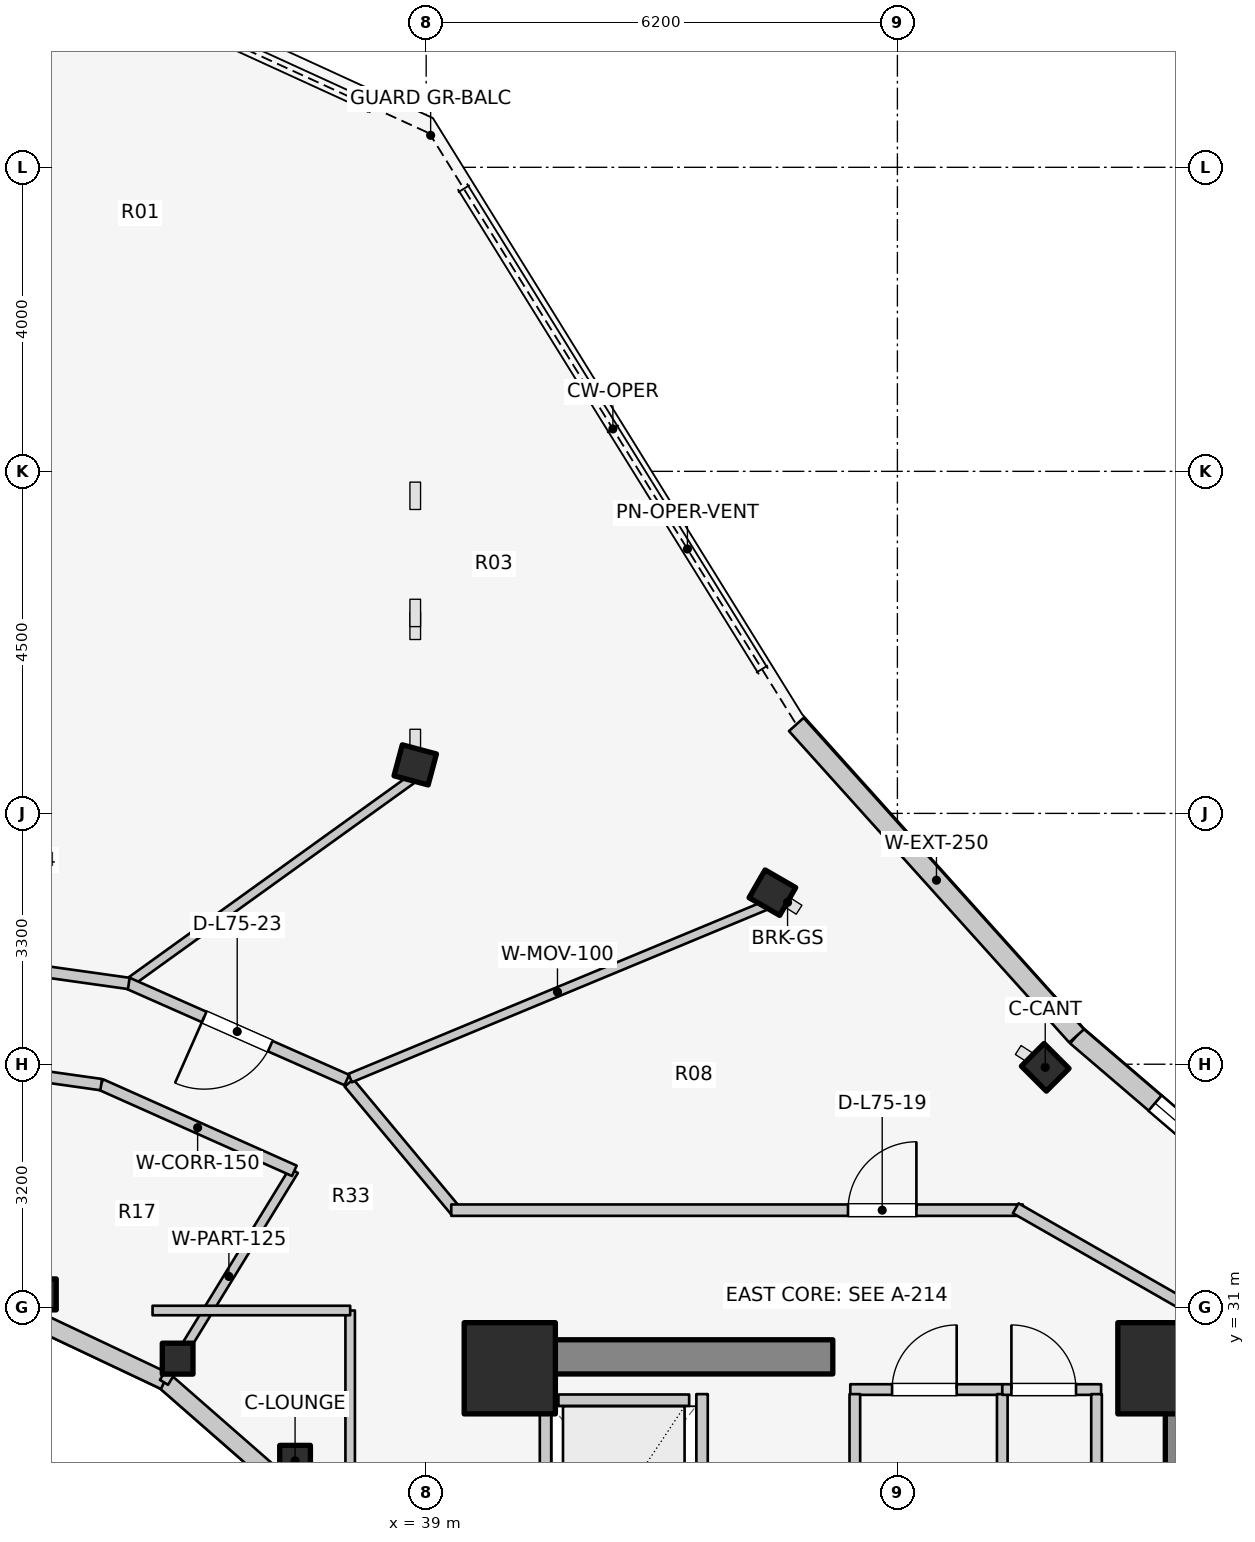
"""IFC4 building model, lengths in metres.
Left out: names, types, materials, properties, quantities, classifications, styles, units other than length and angle.
Written with IfcOpenShell. Run it as: python <this file> out.ifc"""

import sys

from ifc_helpers import new_model, si_unit, direction, frame, frame_2d, origin, origin_2d, place, context, subcontext, project, spatial, rectangle, i_section, extrude, element, fill, save


model = new_model("IFC4")
c1 = context("Model", 3, precision=1e-05, world=origin(), true_north=direction((0.0, 1.0)))
c2 = subcontext(c1, "Body", "Model", "MODEL_VIEW")
j1 = project(units=[si_unit("LENGTHUNIT", "METRE"), si_unit("PLANEANGLEUNIT", "RADIAN")], contexts=[c1])
p1 = place(None, origin())
s1 = spatial("IfcSite", under=j1, at=p1, CompositionType="ELEMENT")
p2 = place(p1, origin())
s2 = spatial("IfcBuilding", under=s1, at=p2, CompositionType="ELEMENT")
p3 = place(p2, frame((0.0, 0.0, 246.0)))
s3 = spatial("IfcBuildingStorey", under=s2, at=p3, CompositionType="ELEMENT", Elevation=246.0)
p4 = place(p3, frame((48.95, 17.05, 0.0), z_axis=(0.0, 0.0, 1.0), x_axis=(0.0, 1.0, 0.0)))
e1 = element("IfcWall", 1, at=p4, inside=s3, PredefinedType="SHEAR", context=c2, shape_type="SweptSolid", body=[
    extrude(rectangle(XDim=12.8, YDim=0.45, at=frame_2d((6.4, 0.0))), origin(), (0.0, 0.0, 1.0), 3.6),
])
p5 = place(p3, frame((39.85, 30.35, 0.0), z_axis=(0.0, 0.0, 1.0), x_axis=(1.0, 0.0, 0.0)))
e2 = element("IfcWall", 2, at=p5, inside=s3, PredefinedType="SHEAR", context=c2, shape_type="SweptSolid", body=[
    extrude(rectangle(XDim=4.5, YDim=0.45, at=frame_2d((2.25, 0.0))), origin(), (0.0, 0.0, 1.0), 3.6),
])
for number, where, z_axis, x_axis in (
    (3, (48.7, 30.2, 0.0), (0.0, 0.0, 1.0), (1.0, 0.0, 0.0)),
    (4, (40.1, 30.2, 0.0), (0.0, 0.0, 1.0), (1.0, 0.0, 0.0)),
):
    element("IfcColumn", number, at=place(p3, frame(where, z_axis=z_axis, x_axis=x_axis)), inside=s3, PredefinedType="COLUMN", context=c2, shape_type="SweptSolid", body=[
        extrude(rectangle(XDim=1.2, YDim=1.2, at=origin_2d()), origin(), (0.0, 0.0, 1.0), 3.6),
    ])
p6 = place(p3, frame((37.275, 28.982, 0.0), z_axis=(0.0, 0.0, 1.0), x_axis=(1.0, 0.0, 0.0)))
e5 = element("IfcColumn", 5, at=p6, inside=s3, PredefinedType="COLUMN", context=c2, shape_type="SweptSolid", body=[
    extrude(i_section(OverallWidth=0.404, OverallDepth=0.407, WebThickness=0.027, FlangeThickness=0.044, FilletRadius=0.025, at=origin_2d()), origin(), (0.0, 0.0, 1.0), 3.6),
])
p7 = place(p3, frame((47.145, 34.159, 0.0), z_axis=(0.0, 0.0, 1.0), x_axis=(0.707106781187, 0.707106781187, 0.0)))
e6 = element("IfcColumn", 6, at=p7, inside=s3, PredefinedType="COLUMN", context=c2, shape_type="SweptSolid", body=[
    extrude(i_section(OverallWidth=0.422, OverallDepth=0.465, WebThickness=0.045, FlangeThickness=0.073, FilletRadius=0.025, at=origin_2d()), origin(), (0.0, 0.0, 1.0), 3.6),
])
p8 = place(p3, frame((35.73, 30.327, 0.0), z_axis=(0.0, 0.0, 1.0), x_axis=(1.0, 0.0, 0.0)))
e7 = element("IfcColumn", 7, at=p8, inside=s3, PredefinedType="COLUMN", context=c2, shape_type="SweptSolid", body=[
    extrude(i_section(OverallWidth=0.404, OverallDepth=0.407, WebThickness=0.027, FlangeThickness=0.044, FilletRadius=0.025, at=origin_2d()), origin(), (0.0, 0.0, 1.0), 3.6),
])
p9 = place(p3, frame((43.555, 36.457, 0.0), z_axis=(0.0, 0.0, 1.0), x_axis=(0.5, 0.866025403784, 0.0)))
e8 = element("IfcColumn", 8, at=p9, inside=s3, PredefinedType="COLUMN", context=c2, shape_type="SweptSolid", body=[
    extrude(i_section(OverallWidth=0.422, OverallDepth=0.465, WebThickness=0.045, FlangeThickness=0.073, FilletRadius=0.025, at=origin_2d()), origin(), (0.0, 0.0, 1.0), 3.6),
])
p10 = place(p3, frame((33.931, 31.172, 0.0), z_axis=(0.0, 0.0, 1.0), x_axis=(1.0, 0.0, 0.0)))
e9 = element("IfcColumn", 9, at=p10, inside=s3, PredefinedType="COLUMN", context=c2, shape_type="SweptSolid", body=[
    extrude(i_section(OverallWidth=0.404, OverallDepth=0.407, WebThickness=0.027, FlangeThickness=0.044, FilletRadius=0.025, at=origin_2d()), origin(), (0.0, 0.0, 1.0), 3.6),
])
p11 = place(p3, frame((38.856, 38.138, 0.0), z_axis=(0.0, 0.0, 1.0), x_axis=(0.258819045103, 0.965925826289, 0.0)))
e10 = element("IfcColumn", 10, at=p11, inside=s3, PredefinedType="COLUMN", context=c2, shape_type="SweptSolid", body=[
    extrude(i_section(OverallWidth=0.422, OverallDepth=0.465, WebThickness=0.045, FlangeThickness=0.073, FilletRadius=0.025, at=origin_2d()), origin(), (0.0, 0.0, 1.0), 3.6),
])
p12 = place(p3, frame((37.035, 28.742, 0.0), z_axis=(0.0, 0.0, 1.0), x_axis=(-0.752576694707, 0.658504607869, 0.0)))
e11 = element("IfcWall", 11, at=p12, inside=s3, PredefinedType="STANDARD", context=c2, shape_type="SweptSolid", body=[
    extrude(rectangle(XDim=1.959, YDim=0.23, at=frame_2d((0.98, 0.0))), origin(), (0.0, 0.0, 1.0), 2.6),
])
p13 = place(p3, frame((35.56, 30.032, 0.0), z_axis=(0.0, 0.0, 1.0), x_axis=(-0.904179699603, 0.427152280606, 0.0)))
e12 = element("IfcWall", 12, at=p13, inside=s3, PredefinedType="STANDARD", context=c2, shape_type="SweptSolid", body=[
    extrude(rectangle(XDim=1.899, YDim=0.23, at=frame_2d((0.95, 0.0))), origin(), (0.0, 0.0, 1.0), 2.6),
])
p14 = place(p3, frame((50.761, 31.829, 0.0), z_axis=(0.0, 0.0, 1.0), x_axis=(-0.759587504333, 0.650405122413, 0.0)))
e13 = element("IfcWall", 13, at=p14, inside=s3, PredefinedType="STANDARD", context=c2, shape_type="SweptSolid", body=[
    extrude(rectangle(XDim=4.217, YDim=0.26, at=frame_2d((2.109, 0.0))), origin(), (0.0, 0.0, 1.0), 3.29),
])
p15 = place(p14, frame((1.359, 0.0, 0.75)))
e14 = element("IfcOpeningElement", 14, at=p15, cuts=e13, PredefinedType="OPENING", context=c2, shape_type="SweptSolid", body=[
    extrude(rectangle(XDim=1.5, YDim=1.6, at=frame_2d((0.75, 0.8))), frame((0.0, 0.14, 0.0), z_axis=(0.0, -1.0, 0.0), x_axis=(1.0, 0.0, 0.0)), (0.0, 0.0, 1.0), 0.28),
])
p16 = place(p3, frame((47.558, 34.572, 0.0), z_axis=(0.0, 0.0, 1.0), x_axis=(-0.668903560134, 0.743349196031, 0.0)))
e15 = element("IfcWall", 15, at=p16, inside=s3, PredefinedType="STANDARD", context=c2, shape_type="SweptSolid", body=[
    extrude(rectangle(XDim=5.513, YDim=0.26, at=frame_2d((2.756, 0.0))), origin(), (0.0, 0.0, 1.0), 3.29),
])
p17 = place(p3, frame((40.74, 29.78, 0.0), z_axis=(0.0, 0.0, 1.0), x_axis=(1.0, 0.0, 0.0)))
e16 = element("IfcWall", 16, at=p17, inside=s3, PredefinedType="SOLIDWALL", context=c2, shape_type="SweptSolid", body=[
    extrude(rectangle(XDim=1.72, YDim=0.15, at=frame_2d((0.86, 0.0))), origin(), (0.0, 0.0, 1.0), 3.295),
])
for number, where, z_axis, x_axis in (
    (17, (40.57, 27.14, 0.0), (0.0, 0.0, 1.0), (0.0, 1.0, 0.0)),
    (18, (42.63, 27.14, 0.0), (0.0, 0.0, 1.0), (0.0, 1.0, 0.0)),
):
    element("IfcWall", number, at=place(p3, frame(where, z_axis=z_axis, x_axis=x_axis)), inside=s3, PredefinedType="SOLIDWALL", context=c2, shape_type="SweptSolid", body=[
        extrude(rectangle(XDim=2.72, YDim=0.15, at=frame_2d((1.36, 0.0))), origin(), (0.0, 0.0, 1.0), 3.295),
    ])
p18 = place(p3, frame((44.58, 29.92, 0.0), z_axis=(0.0, 0.0, 1.0), x_axis=(1.0, 0.0, 0.0)))
e19 = element("IfcWall", 19, at=p18, inside=s3, PredefinedType="PLUMBINGWALL", context=c2, shape_type="SweptSolid", body=[
    extrude(rectangle(XDim=2.0, YDim=0.14, at=frame_2d((1.0, 0.0))), origin(), (0.0, 0.0, 1.0), 3.295),
])
p19 = place(p18, frame((0.55, 0.0, 0.0)))
e20 = element("IfcOpeningElement", 20, at=p19, cuts=e19, PredefinedType="OPENING", context=c2, shape_type="SweptSolid", body=[
    extrude(rectangle(XDim=0.85, YDim=2.05, at=frame_2d((0.425, 1.025))), frame((0.0, 0.08, 0.0), z_axis=(0.0, -1.0, 0.0), x_axis=(1.0, 0.0, 0.0)), (0.0, 0.0, 1.0), 0.16),
])
for number, where, z_axis, x_axis in (
    (21, (44.64, 25.98, 0.0), (0.0, 0.0, 1.0), (0.0, 1.0, 0.0)),
    (22, (46.58, 25.98, 0.0), (0.0, 0.0, 1.0), (0.0, 1.0, 0.0)),
):
    element("IfcWall", number, at=place(p3, frame(where, z_axis=z_axis, x_axis=x_axis)), inside=s3, PredefinedType="PLUMBINGWALL", context=c2, shape_type="SweptSolid", body=[
        extrude(rectangle(XDim=3.88, YDim=0.14, at=frame_2d((1.94, 0.0))), origin(), (0.0, 0.0, 1.0), 3.295),
    ])
p20 = place(p3, frame((46.58, 29.92, 0.0), z_axis=(0.0, 0.0, 1.0), x_axis=(1.0, 0.0, 0.0)))
e23 = element("IfcWall", 23, at=p20, inside=s3, PredefinedType="PLUMBINGWALL", context=c2, shape_type="SweptSolid", body=[
    extrude(rectangle(XDim=1.3, YDim=0.14, at=frame_2d((0.65, 0.0))), origin(), (0.0, 0.0, 1.0), 3.295),
])
p21 = place(p20, frame((0.12, 0.0, 0.0)))
e24 = element("IfcOpeningElement", 24, at=p21, cuts=e23, PredefinedType="OPENING", context=c2, shape_type="SweptSolid", body=[
    extrude(rectangle(XDim=0.85, YDim=2.05, at=frame_2d((0.425, 1.025))), frame((0.0, 0.08, 0.0), z_axis=(0.0, -1.0, 0.0), x_axis=(1.0, 0.0, 0.0)), (0.0, 0.0, 1.0), 0.16),
])
p22 = place(p3, frame((47.82, 25.98, 0.0), z_axis=(0.0, 0.0, 1.0), x_axis=(0.0, 1.0, 0.0)))
e25 = element("IfcWall", 25, at=p22, inside=s3, PredefinedType="PLUMBINGWALL", context=c2, shape_type="SweptSolid", body=[
    extrude(rectangle(XDim=3.88, YDim=0.14, at=frame_2d((1.94, 0.0))), origin(), (0.0, 0.0, 1.0), 3.295),
])
p23 = place(p3, frame((35.55, 30.015, 0.0), z_axis=(0.0, 0.0, 1.0), x_axis=(0.522763432117, 0.852477796802, 0.0)))
e26 = element("IfcWall", 26, at=p23, inside=s3, PredefinedType="PARTITIONING", context=c2, shape_type="SweptSolid", body=[
    extrude(rectangle(XDim=3.269, YDim=0.125, at=frame_2d((1.635, 0.0))), origin(), (0.0, 0.0, 1.0), 2.672),
])
p24 = place(p3, frame((37.265, 32.798, 0.0), z_axis=(0.0, 0.0, 1.0), x_axis=(-0.913254317828, 0.407389924971, 0.0)))
e27 = element("IfcWall", 27, at=p24, inside=s3, PredefinedType="PARTITIONING", context=c2, shape_type="SweptSolid", body=[
    extrude(rectangle(XDim=2.787, YDim=0.15, at=frame_2d((1.393, 0.0))), origin(), (0.0, 0.0, 1.0), 2.823),
])
p25 = place(p3, frame((34.724, 33.932, 0.0), z_axis=(0.0, 0.0, 1.0), x_axis=(-0.990150268487, 0.140008734782, 0.0)))
e28 = element("IfcWall", 28, at=p25, inside=s3, PredefinedType="PARTITIONING", context=c2, shape_type="SweptSolid", body=[
    extrude(rectangle(XDim=2.759, YDim=0.15, at=frame_2d((1.379, 0.0))), origin(), (0.0, 0.0, 1.0), 2.823),
])
p26 = place(p25, frame((0.904, 0.0, 0.0)))
e29 = element("IfcOpeningElement", 29, at=p26, cuts=e28, PredefinedType="OPENING", context=c2, shape_type="SweptSolid", body=[
    extrude(rectangle(XDim=0.95, YDim=2.1, at=frame_2d((0.475, 1.05))), frame((0.0, 0.085, 0.0), z_axis=(0.0, -1.0, 0.0), x_axis=(1.0, 0.0, 0.0)), (0.0, 0.0, 1.0), 0.17),
])
p27 = place(p3, frame((38.0, 25.8, 0.0), z_axis=(0.0, 0.0, 1.0), x_axis=(0.0, 1.0, 0.0)))
e30 = element("IfcWall", 30, at=p27, inside=s3, PredefinedType="PARTITIONING", context=c2, shape_type="SweptSolid", body=[
    extrude(rectangle(XDim=5.16, YDim=0.125, at=frame_2d((2.58, 0.0))), origin(), (0.0, 0.0, 1.0), 2.672),
])
p28 = place(p3, frame((35.4, 30.96, 0.0), z_axis=(0.0, 0.0, 1.0), x_axis=(1.0, 0.0, 0.0)))
e31 = element("IfcWall", 31, at=p28, inside=s3, PredefinedType="PARTITIONING", context=c2, shape_type="SweptSolid", body=[
    extrude(rectangle(XDim=2.6, YDim=0.125, at=frame_2d((1.3, 0.0))), origin(), (0.0, 0.0, 1.0), 2.816),
])
p29 = place(p3, frame((37.984, 33.955, 0.0), z_axis=(0.0, 0.0, 1.0), x_axis=(0.64030392053, -0.76812166312, 0.0)))
e32 = element("IfcWall", 32, at=p29, inside=s3, PredefinedType="PARTITIONING", context=c2, shape_type="SweptSolid", body=[
    extrude(rectangle(XDim=2.21, YDim=0.15, at=frame_2d((1.105, 0.0))), origin(), (0.0, 0.0, 1.0), 2.816),
])
p30 = place(p3, frame((39.33, 32.28, 0.0), z_axis=(0.0, 0.0, 1.0), x_axis=(1.0, 0.0, 0.0)))
e33 = element("IfcWall", 33, at=p30, inside=s3, PredefinedType="PARTITIONING", context=c2, shape_type="SweptSolid", body=[
    extrude(rectangle(XDim=7.52, YDim=0.15, at=frame_2d((3.76, 0.0))), origin(), (0.0, 0.0, 1.0), 2.816),
])
p31 = place(p30, frame((5.22, 0.0, 0.0)))
e34 = element("IfcOpeningElement", 34, at=p31, cuts=e33, PredefinedType="OPENING", context=c2, shape_type="SweptSolid", body=[
    extrude(rectangle(XDim=0.9, YDim=2.1, at=frame_2d((0.45, 1.05))), frame((0.0, 0.085, 0.0), z_axis=(0.0, -1.0, 0.0), x_axis=(1.0, 0.0, 0.0)), (0.0, 0.0, 1.0), 0.17),
])
p32 = place(p3, frame((46.757, 32.305, 0.0), z_axis=(0.0, 0.0, 1.0), x_axis=(0.867991349648, -0.496579315857, 0.0)))
e35 = element("IfcWall", 35, at=p32, inside=s3, PredefinedType="PARTITIONING", context=c2, shape_type="SweptSolid", body=[
    extrude(rectangle(XDim=2.567, YDim=0.15, at=frame_2d((1.283, 0.0))), origin(), (0.0, 0.0, 1.0), 2.66),
])
p33 = place(p3, frame((38.0, 34.018, 0.0), z_axis=(0.0, 0.0, 1.0), x_axis=(0.92349333748, 0.383614462228, 0.0)))
e36 = element("IfcWall", 36, at=p33, inside=s3, PredefinedType="MOVABLE", context=c2, shape_type="SweptSolid", body=[
    extrude(rectangle(XDim=5.907, YDim=0.12, at=frame_2d((2.954, 0.0))), origin(), (0.0, 0.0, 1.0), 2.66),
])
p34 = place(p3, frame((35.124, 35.297, 0.0), z_axis=(0.0, 0.0, 1.0), x_axis=(0.811745719064, 0.584011033783, 0.0)))
e37 = element("IfcWall", 37, at=p34, inside=s3, PredefinedType="MOVABLE", context=c2, shape_type="SweptSolid", body=[
    extrude(rectangle(XDim=4.534, YDim=0.12, at=frame_2d((2.267, 0.0))), origin(), (0.0, 0.0, 1.0), 2.66),
])
p35 = place(p3, frame((37.956, 33.992, 0.0), z_axis=(0.0, 0.0, 1.0), x_axis=(-0.914642679993, 0.404263240891, 0.0)))
e38 = element("IfcWall", 38, at=p35, inside=s3, PredefinedType="PARTITIONING", context=c2, shape_type="SweptSolid", body=[
    extrude(rectangle(XDim=3.154, YDim=0.15, at=frame_2d((1.577, 0.0))), origin(), (0.0, 0.0, 1.0), 2.823),
])
p36 = place(p35, frame((1.102, 0.0, 0.0)))
e39 = element("IfcOpeningElement", 39, at=p36, cuts=e38, PredefinedType="OPENING", context=c2, shape_type="SweptSolid", body=[
    extrude(rectangle(XDim=0.95, YDim=2.1, at=frame_2d((0.475, 1.05))), frame((0.0, 0.085, 0.0), z_axis=(0.0, -1.0, 0.0), x_axis=(1.0, 0.0, 0.0)), (0.0, 0.0, 1.0), 0.17),
])
p37 = place(p3, frame((35.087, 35.263, 0.0), z_axis=(0.0, 0.0, 1.0), x_axis=(-0.990268690673, 0.139168675614, 0.0)))
e40 = element("IfcWall", 40, at=p37, inside=s3, PredefinedType="PARTITIONING", context=c2, shape_type="SweptSolid", body=[
    extrude(rectangle(XDim=3.126, YDim=0.15, at=frame_2d((1.563, 0.0))), origin(), (0.0, 0.0, 1.0), 2.823),
])
p38 = place(p37, frame((1.088, 0.0, 0.0)))
e41 = element("IfcOpeningElement", 41, at=p38, cuts=e40, PredefinedType="OPENING", context=c2, shape_type="SweptSolid", body=[
    extrude(rectangle(XDim=0.95, YDim=2.1, at=frame_2d((0.475, 1.05))), frame((0.0, 0.085, 0.0), z_axis=(0.0, -1.0, 0.0), x_axis=(1.0, 0.0, 0.0)), (0.0, 0.0, 1.0), 0.17),
])
p39 = place(p15, origin())
e42 = element("IfcWindow", 42, at=p39, inside=s3, PartitioningType="SINGLE_PANEL", PredefinedType="WINDOW", context=c2, shape_type="SweptSolid", body=[
    extrude(rectangle(XDim=1.5, YDim=1.6, at=frame_2d((0.75, 0.8))), frame((0.0, 0.03, 0.0), z_axis=(0.0, -1.0, 0.0), x_axis=(1.0, 0.0, 0.0)), (0.0, 0.0, 1.0), 0.06),
])
fill(e14, e42)
p40 = place(p19, origin())
e43 = element("IfcDoor", 43, at=p40, inside=s3, OperationType="SINGLE_SWING_RIGHT", PredefinedType="DOOR", context=c2, shape_type="SweptSolid", body=[
    extrude(rectangle(XDim=0.85, YDim=2.05, at=frame_2d((0.425, 1.025))), frame((0.0, 0.025, 0.0), z_axis=(0.0, -1.0, 0.0), x_axis=(1.0, 0.0, 0.0)), (0.0, 0.0, 1.0), 0.05),
])
fill(e20, e43)
p41 = place(p21, origin())
e44 = element("IfcDoor", 44, at=p41, inside=s3, OperationType="SINGLE_SWING_LEFT", PredefinedType="DOOR", context=c2, shape_type="SweptSolid", body=[
    extrude(rectangle(XDim=0.85, YDim=2.05, at=frame_2d((0.425, 1.025))), frame((0.0, 0.025, 0.0), z_axis=(0.0, -1.0, 0.0), x_axis=(1.0, 0.0, 0.0)), (0.0, 0.0, 1.0), 0.05),
])
fill(e24, e44)
p42 = place(p31, origin())
e45 = element("IfcDoor", 45, at=p42, inside=s3, OperationType="SINGLE_SWING_RIGHT", PredefinedType="DOOR", context=c2, shape_type="SweptSolid", body=[
    extrude(rectangle(XDim=0.9, YDim=2.1, at=frame_2d((0.45, 1.05))), frame((0.0, 0.025, 0.0), z_axis=(0.0, -1.0, 0.0), x_axis=(1.0, 0.0, 0.0)), (0.0, 0.0, 1.0), 0.05),
])
fill(e34, e45)
p43 = place(p36, origin())
e46 = element("IfcDoor", 46, at=p43, inside=s3, OperationType="SINGLE_SWING_RIGHT", PredefinedType="DOOR", context=c2, shape_type="SweptSolid", body=[
    extrude(rectangle(XDim=0.95, YDim=2.1, at=frame_2d((0.475, 1.05))), frame((0.0, 0.025, 0.0), z_axis=(0.0, -1.0, 0.0), x_axis=(1.0, 0.0, 0.0)), (0.0, 0.0, 1.0), 0.05),
])
fill(e39, e46)
save(model, sys.argv[1])
